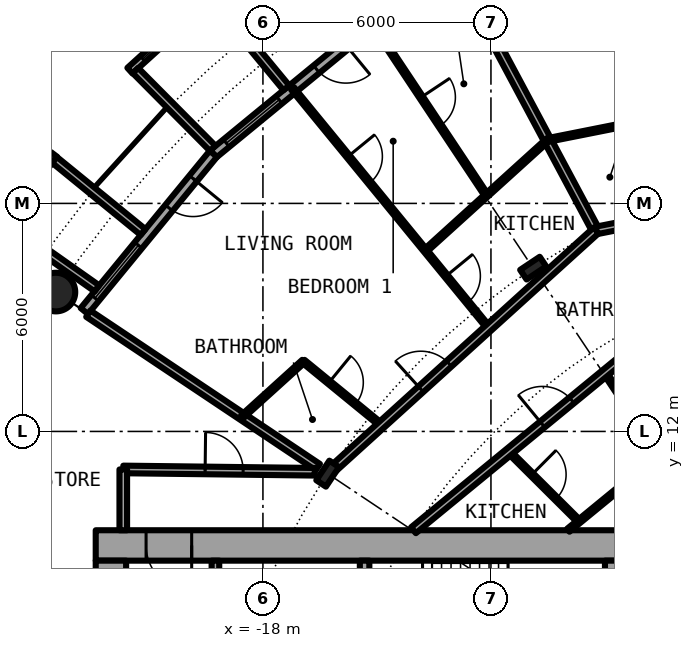
"""IFC4 building model, lengths in metres.
Left out: names, types, materials, properties, quantities, classifications, styles, units other than length and angle.
Written with IfcOpenShell. Run it as: python <this file> out.ifc"""

import sys

from ifc_helpers import new_model, si_unit, direction, frame, frame_2d, origin, origin_2d, place, context, subcontext, project, spatial, rectangle, circle, hollow_circle, i_section, extrude, element, fill, save


model = new_model("IFC4")
c1 = context("Model", 3, precision=1e-05, world=origin(), true_north=direction((0.0, 1.0)))
c2 = subcontext(c1, "Body", "Model", "MODEL_VIEW")
j1 = project(units=[si_unit("LENGTHUNIT", "METRE"), si_unit("PLANEANGLEUNIT", "RADIAN")], contexts=[c1])
p1 = place(None, origin())
s1 = spatial("IfcSite", under=j1, at=p1, CompositionType="ELEMENT")
p2 = place(p1, origin())
s2 = spatial("IfcBuilding", under=s1, at=p2, CompositionType="ELEMENT")
p3 = place(p2, frame((0.0, 0.0, 35.0)))
s3 = spatial("IfcBuildingStorey", under=s2, at=p3, CompositionType="ELEMENT", Elevation=35.0)
p4 = place(p3, frame((-23.448, 15.667, 0.0), z_axis=(0.0, 0.0, 1.0), x_axis=(1.0, 0.0, 0.0)))
e1 = element("IfcColumn", 1, at=p4, inside=s3, PredefinedType="COLUMN", context=c2, shape_type="SweptSolid", body=[
    extrude(hollow_circle(Radius=0.508, WallThickness=0.05, at=origin_2d()), origin(), (0.0, 0.0, 1.0), 3.05),
])
for number, where, z_axis, x_axis in (
    (2, (-10.889, 16.297, 0.0), (0.0, 0.0, 1.0), (-0.556, 0.831, 0.0)),
    (3, (-16.297, 10.889, 0.0), (0.0, 0.0, 1.0), (-0.831, 0.556, 0.0)),
):
    element("IfcColumn", number, at=place(p3, frame(where, z_axis=z_axis, x_axis=x_axis)), inside=s3, PredefinedType="COLUMN", context=c2, shape_type="SweptSolid", body=[
        extrude(i_section(OverallWidth=0.305, OverallDepth=0.62, WebThickness=0.021, FlangeThickness=0.04, FilletRadius=0.027, at=origin_2d()), origin(), (0.0, 0.0, 1.0), 3.05),
    ])
p5 = place(p3, frame((-15.167, 22.699, 0.0), z_axis=(0.0, 0.0, 1.0), x_axis=(-0.773019449054, -0.634382322723, 0.0)))
e4 = element("IfcWall", 4, at=p5, inside=s3, PredefinedType="SOLIDWALL", context=c2, shape_type="SweptSolid", body=[
    extrude(rectangle(XDim=5.352, YDim=0.25, at=frame_2d((2.676, 0.0))), origin(), (0.0, 0.0, 1.0), 2.7),
])
p6 = place(p5, frame((0.841, 0.0, 0.0)))
e5 = element("IfcOpeningElement", 5, at=p6, cuts=e4, PredefinedType="OPENING", context=c2, shape_type="SweptSolid", body=[
    extrude(rectangle(XDim=1.0, YDim=2.2, at=frame_2d((0.5, 1.1))), frame((0.0, 0.135, 0.0), z_axis=(0.0, -1.0, 0.0), x_axis=(1.0, 0.0, 0.0)), (0.0, 0.0, 1.0), 0.27),
])
p7 = place(p5, frame((3.111, 0.0, 0.3)))
e6 = element("IfcOpeningElement", 6, at=p7, cuts=e4, PredefinedType="OPENING", context=c2, shape_type="SweptSolid", body=[
    extrude(rectangle(XDim=1.8, YDim=2.1, at=frame_2d((0.9, 1.05))), frame((0.0, 0.135, 0.0), z_axis=(0.0, -1.0, 0.0), x_axis=(1.0, 0.0, 0.0)), (0.0, 0.0, 1.0), 0.27),
])
p8 = place(p3, frame((-19.282, 23.503, -0.03), z_axis=(0.0, 0.0, 1.0), x_axis=(-0.740998365753, -0.671506829416, 0.0)))
e7 = element("IfcWall", 7, at=p8, inside=s3, PredefinedType="SOLIDWALL", context=c2, shape_type="SweptSolid", body=[
    extrude(rectangle(XDim=2.993, YDim=0.2, at=frame_2d((1.497, 0.0))), origin(), (0.0, 0.0, 1.0), 2.73),
])
p9 = place(p8, frame((0.457, 0.0, 0.33)))
e8 = element("IfcOpeningElement", 8, at=p9, cuts=e7, PredefinedType="OPENING", context=c2, shape_type="SweptSolid", body=[
    extrude(circle(Radius=1.04, at=frame_2d((1.04, 1.04))), frame((0.0, 0.11, 0.0), z_axis=(0.0, -1.0, 0.0), x_axis=(1.0, 0.0, 0.0)), (0.0, 0.0, 1.0), 0.22),
])
p10 = place(p3, frame((-17.384, 21.041, -0.03), z_axis=(0.0, 0.0, 1.0), x_axis=(-0.63709551667, 0.770784861449, 0.0)))
e9 = element("IfcWall", 9, at=p10, inside=s3, PredefinedType="SOLIDWALL", context=c2, shape_type="SweptSolid", body=[
    extrude(rectangle(XDim=3.006, YDim=0.2, at=frame_2d((1.503, 0.0))), origin(), (0.0, 0.0, 1.0), 2.73),
])
p11 = place(p3, frame((-19.323, 19.45, -0.03), z_axis=(0.0, 0.0, 1.0), x_axis=(-0.704476739375, 0.709727076896, 0.0)))
e10 = element("IfcWall", 10, at=p11, inside=s3, PredefinedType="SOLIDWALL", context=c2, shape_type="SweptSolid", body=[
    extrude(rectangle(XDim=2.883, YDim=0.2, at=frame_2d((1.441, 0.0))), origin(), (0.0, 0.0, 1.0), 2.73),
])
p12 = place(p3, frame((-19.304, 19.304, 0.0), z_axis=(0.0, 0.0, 1.0), x_axis=(-0.634382322723, -0.773019449054, 0.0)))
e11 = element("IfcWall", 11, at=p12, inside=s3, PredefinedType="SOLIDWALL", context=c2, shape_type="SweptSolid", body=[
    extrude(rectangle(XDim=5.352, YDim=0.25, at=frame_2d((2.676, 0.0))), origin(), (0.0, 0.0, 1.0), 2.7),
])
p13 = place(p12, frame((0.841, 0.0, 0.0)))
e12 = element("IfcOpeningElement", 12, at=p13, cuts=e11, PredefinedType="OPENING", context=c2, shape_type="SweptSolid", body=[
    extrude(rectangle(XDim=1.0, YDim=2.2, at=frame_2d((0.5, 1.1))), frame((0.0, 0.135, 0.0), z_axis=(0.0, -1.0, 0.0), x_axis=(1.0, 0.0, 0.0)), (0.0, 0.0, 1.0), 0.27),
])
p14 = place(p12, frame((3.111, 0.0, 0.3)))
e13 = element("IfcOpeningElement", 13, at=p14, cuts=e11, PredefinedType="OPENING", context=c2, shape_type="SweptSolid", body=[
    extrude(rectangle(XDim=1.8, YDim=2.1, at=frame_2d((0.9, 1.05))), frame((0.0, 0.135, 0.0), z_axis=(0.0, -1.0, 0.0), x_axis=(1.0, 0.0, 0.0)), (0.0, 0.0, 1.0), 0.27),
])
p15 = place(p3, frame((-23.497, 19.289, -0.03), z_axis=(0.0, 0.0, 1.0), x_axis=(-0.60418752353, -0.796842165306, 0.0)))
e14 = element("IfcWall", 14, at=p15, inside=s3, PredefinedType="SOLIDWALL", context=c2, shape_type="SweptSolid", body=[
    extrude(rectangle(XDim=2.337, YDim=0.2, at=frame_2d((1.168, 0.0))), origin(), (0.0, 0.0, 1.0), 2.73),
])
p16 = place(p15, frame((0.128, 0.0, 0.33)))
e15 = element("IfcOpeningElement", 15, at=p16, cuts=e14, PredefinedType="OPENING", context=c2, shape_type="SweptSolid", body=[
    extrude(circle(Radius=1.04, at=frame_2d((1.04, 1.04))), frame((0.0, 0.11, 0.0), z_axis=(0.0, -1.0, 0.0), x_axis=(1.0, 0.0, 0.0)), (0.0, 0.0, 1.0), 0.22),
])
p17 = place(p3, frame((-21.155, 17.246, -0.03), z_axis=(0.0, 0.0, 1.0), x_axis=(-0.775179004516, 0.631741648902, 0.0)))
e16 = element("IfcWall", 16, at=p17, inside=s3, PredefinedType="SOLIDWALL", context=c2, shape_type="SweptSolid", body=[
    extrude(rectangle(XDim=3.006, YDim=0.2, at=frame_2d((1.503, 0.0))), origin(), (0.0, 0.0, 1.0), 2.73),
])
p18 = place(p3, frame((-22.37, 15.765, -0.03), z_axis=(0.0, 0.0, 1.0), x_axis=(-0.817256123454, 0.576274612209, 0.0)))
e17 = element("IfcWall", 17, at=p18, inside=s3, PredefinedType="SOLIDWALL", context=c2, shape_type="SweptSolid", body=[
    extrude(rectangle(XDim=2.933, YDim=0.2, at=frame_2d((1.466, 0.0))), origin(), (0.0, 0.0, 1.0), 2.73),
])
p19 = place(p3, frame((-8.2, 9.0, 0.0), z_axis=(0.0, 0.0, 1.0), x_axis=(-1.0, 0.0, 0.0)))
e18 = element("IfcWall", 18, at=p19, inside=s3, PredefinedType="SHEAR", context=c2, shape_type="SweptSolid", body=[
    extrude(rectangle(XDim=14.2, YDim=0.8, at=frame_2d((7.1, 0.0))), origin(), (0.0, 0.0, 1.0), 3.05),
])
p20 = place(p19, frame((11.675, 0.0, 0.0)))
e19 = element("IfcOpeningElement", 19, at=p20, cuts=e18, PredefinedType="OPENING", context=c2, shape_type="SweptSolid", body=[
    extrude(rectangle(XDim=1.2, YDim=2.3, at=frame_2d((0.6, 1.15))), frame((0.0, 0.41, 0.0), z_axis=(0.0, -1.0, 0.0), x_axis=(1.0, 0.0, 0.0)), (0.0, 0.0, 1.0), 0.82),
])
p21 = place(p3, frame((-22.0, -8.6, 0.0), z_axis=(0.0, 0.0, 1.0), x_axis=(0.0, 1.0, 0.0)))
e20 = element("IfcWall", 20, at=p21, inside=s3, PredefinedType="SHEAR", context=c2, shape_type="SweptSolid", body=[
    extrude(rectangle(XDim=17.2, YDim=0.8, at=frame_2d((8.6, 0.0))), origin(), (0.0, 0.0, 1.0), 3.05),
])
p22 = place(p21, frame((7.7, 0.0, 0.0)))
e21 = element("IfcOpeningElement", 21, at=p22, cuts=e20, PredefinedType="OPENING", context=c2, shape_type="SweptSolid", body=[
    extrude(rectangle(XDim=1.8, YDim=2.3, at=frame_2d((0.9, 1.15))), frame((0.0, 0.41, 0.0), z_axis=(0.0, -1.0, 0.0), x_axis=(1.0, 0.0, 0.0)), (0.0, 0.0, 1.0), 0.82),
])
p23 = place(p3, frame((-8.6, 8.6, 0.0), z_axis=(0.0, 0.0, 1.0), x_axis=(0.0, -1.0, 0.0)))
e22 = element("IfcWall", 22, at=p23, inside=s3, PredefinedType="SHEAR", context=c2, shape_type="SweptSolid", body=[
    extrude(rectangle(XDim=17.2, YDim=0.8, at=frame_2d((8.6, 0.0))), origin(), (0.0, 0.0, 1.0), 3.05),
])
p24 = place(p23, frame((7.4, 0.0, 0.1)))
e23 = element("IfcOpeningElement", 23, at=p24, cuts=e22, PredefinedType="OPENING", context=c2, shape_type="SweptSolid", body=[
    extrude(rectangle(XDim=2.4, YDim=2.2, at=frame_2d((1.2, 1.1))), frame((0.0, 0.41, 0.0), z_axis=(0.0, -1.0, 0.0), x_axis=(1.0, 0.0, 0.0)), (0.0, 0.0, 1.0), 0.82),
])
p25 = place(p3, frame((-15.325, 8.6, 0.0), z_axis=(0.0, 0.0, 1.0), x_axis=(0.0, -1.0, 0.0)))
e24 = element("IfcWall", 24, at=p25, inside=s3, PredefinedType="SHEAR", context=c2, shape_type="SweptSolid", body=[
    extrude(rectangle(XDim=3.95, YDim=0.25, at=frame_2d((1.975, 0.0))), origin(), (0.0, 0.0, 1.0), 3.05),
])
p26 = place(p25, frame((2.025, 0.0, 0.0)))
e25 = element("IfcOpeningElement", 25, at=p26, cuts=e24, PredefinedType="OPENING", context=c2, shape_type="SweptSolid", body=[
    extrude(rectangle(XDim=1.2, YDim=2.3, at=frame_2d((0.6, 1.15))), frame((0.0, 0.135, 0.0), z_axis=(0.0, -1.0, 0.0), x_axis=(1.0, 0.0, 0.0)), (0.0, 0.0, 1.0), 0.27),
])
p27 = place(p3, frame((-19.25, 8.6, 0.0), z_axis=(0.0, 0.0, 1.0), x_axis=(0.0, -1.0, 0.0)))
e26 = element("IfcWall", 26, at=p27, inside=s3, PredefinedType="SOLIDWALL", context=c2, shape_type="SweptSolid", body=[
    extrude(rectangle(XDim=7.025, YDim=0.2, at=frame_2d((3.513, 0.0))), origin(), (0.0, 0.0, 1.0), 2.7),
])
p28 = place(p27, frame((2.35, 0.0, 0.0)))
e27 = element("IfcOpeningElement", 27, at=p28, cuts=e26, PredefinedType="OPENING", context=c2, shape_type="SweptSolid", body=[
    extrude(rectangle(XDim=1.1, YDim=2.3, at=frame_2d((0.55, 1.15))), frame((0.0, 0.11, 0.0), z_axis=(0.0, -1.0, 0.0), x_axis=(1.0, 0.0, 0.0)), (0.0, 0.0, 1.0), 0.22),
])
p29 = place(p3, frame((-22.595, 15.098, 0.0), z_axis=(0.0, 0.0, 1.0), x_axis=(0.831403467378, -0.55566921314, 0.0)))
e28 = element("IfcWall", 28, at=p29, inside=s3, PredefinedType="PARTITIONING", context=c2, shape_type="SweptSolid", body=[
    extrude(rectangle(XDim=7.265, YDim=0.2, at=frame_2d((3.632, 0.0))), origin(), (0.0, 0.0, 1.0), 2.7),
])
p30 = place(p3, frame((-17.219, 21.023, 0.0), z_axis=(0.0, 0.0, 1.0), x_axis=(0.633664062855, -0.773608334654, 0.0)))
e29 = element("IfcWall", 29, at=p30, inside=s3, PredefinedType="PARTITIONING", context=c2, shape_type="SweptSolid", body=[
    extrude(rectangle(XDim=8.138, YDim=0.1, at=frame_2d((4.069, 0.0))), origin(), (0.0, 0.0, 1.0), 2.7),
])
p31 = place(p30, frame((6.377, 0.0, 0.0)))
e30 = element("IfcOpeningElement", 30, at=p31, cuts=e29, PredefinedType="OPENING", context=c2, shape_type="SweptSolid", body=[
    extrude(rectangle(XDim=0.9, YDim=2.3, at=frame_2d((0.45, 1.15))), frame((0.0, 0.06, 0.0), z_axis=(0.0, -1.0, 0.0), x_axis=(1.0, 0.0, 0.0)), (0.0, 0.0, 1.0), 0.12),
])
p32 = place(p30, frame((2.308, 0.0, 0.0)))
e31 = element("IfcOpeningElement", 31, at=p32, cuts=e29, PredefinedType="OPENING", context=c2, shape_type="SweptSolid", body=[
    extrude(rectangle(XDim=0.9, YDim=2.3, at=frame_2d((0.45, 1.15))), frame((0.0, 0.06, 0.0), z_axis=(0.0, -1.0, 0.0), x_axis=(1.0, 0.0, 0.0)), (0.0, 0.0, 1.0), 0.12),
])
p33 = place(p3, frame((-16.936, 13.845, 0.0), z_axis=(0.0, 0.0, 1.0), x_axis=(0.774162545943, -0.632986850147, 0.0)))
e32 = element("IfcWall", 32, at=p33, inside=s3, PredefinedType="PARTITIONING", context=c2, shape_type="SweptSolid", body=[
    extrude(rectangle(XDim=2.649, YDim=0.1, at=frame_2d((1.325, 0.0))), origin(), (0.0, 0.0, 1.0), 2.7),
])
p34 = place(p33, frame((0.875, 0.0, 0.0)))
e33 = element("IfcOpeningElement", 33, at=p34, cuts=e32, PredefinedType="OPENING", context=c2, shape_type="SweptSolid", body=[
    extrude(rectangle(XDim=0.9, YDim=2.3, at=frame_2d((0.45, 1.15))), frame((0.0, 0.06, 0.0), z_axis=(0.0, -1.0, 0.0), x_axis=(1.0, 0.0, 0.0)), (0.0, 0.0, 1.0), 0.12),
])
p35 = place(p3, frame((-15.054, 22.624, 0.0), z_axis=(0.0, 0.0, 1.0), x_axis=(0.553913391217, -0.832574294, 0.0)))
e34 = element("IfcWall", 34, at=p35, inside=s3, PredefinedType="PARTITIONING", context=c2, shape_type="SweptSolid", body=[
    extrude(rectangle(XDim=5.301, YDim=0.1, at=frame_2d((2.65, 0.0))), origin(), (0.0, 0.0, 1.0), 2.7),
])
p36 = place(p35, frame((2.2, 0.0, 0.0)))
e35 = element("IfcOpeningElement", 35, at=p36, cuts=e34, PredefinedType="OPENING", context=c2, shape_type="SweptSolid", body=[
    extrude(rectangle(XDim=0.9, YDim=2.3, at=frame_2d((0.45, 1.15))), frame((0.0, 0.06, 0.0), z_axis=(0.0, -1.0, 0.0), x_axis=(1.0, 0.0, 0.0)), (0.0, 0.0, 1.0), 0.12),
])
p37 = place(p3, frame((-12.81, 23.966, 0.0), z_axis=(0.0, 0.0, 1.0), x_axis=(0.471439510802, -0.881898399848, 0.0)))
e36 = element("IfcWall", 36, at=p37, inside=s3, PredefinedType="PARTITIONING", context=c2, shape_type="SweptSolid", body=[
    extrude(rectangle(XDim=7.575, YDim=0.2, at=frame_2d((3.787, 0.0))), origin(), (0.0, 0.0, 1.0), 2.7),
])
p38 = place(p3, frame((-11.524, 11.464, 0.0), z_axis=(0.0, 0.0, 1.0), x_axis=(0.708796844581, -0.705412668665, 0.0)))
e37 = element("IfcWall", 37, at=p38, inside=s3, PredefinedType="PARTITIONING", context=c2, shape_type="SweptSolid", body=[
    extrude(rectangle(XDim=2.597, YDim=0.1, at=frame_2d((1.299, 0.0))), origin(), (0.0, 0.0, 1.0), 2.7),
])
p39 = place(p38, frame((0.849, 0.0, 0.0)))
e38 = element("IfcOpeningElement", 38, at=p39, cuts=e37, PredefinedType="OPENING", context=c2, shape_type="SweptSolid", body=[
    extrude(rectangle(XDim=0.9, YDim=2.3, at=frame_2d((0.45, 1.15))), frame((0.0, 0.06, 0.0), z_axis=(0.0, -1.0, 0.0), x_axis=(1.0, 0.0, 0.0)), (0.0, 0.0, 1.0), 0.12),
])
p40 = place(p3, frame((-8.996, 13.539, 0.0), z_axis=(0.0, 0.0, 1.0), x_axis=(0.553615197403, -0.83277260594, 0.0)))
e39 = element("IfcWall", 39, at=p40, inside=s3, PredefinedType="PARTITIONING", context=c2, shape_type="SweptSolid", body=[
    extrude(rectangle(XDim=2.597, YDim=0.1, at=frame_2d((1.299, 0.0))), origin(), (0.0, 0.0, 1.0), 2.7),
])
p41 = place(p3, frame((-21.675, 11.0, 0.0), z_axis=(0.0, 0.0, 1.0), x_axis=(0.999926652916, -0.012111514691, 0.0)))
e40 = element("IfcWall", 40, at=p41, inside=s3, PredefinedType="PARTITIONING", context=c2, shape_type="SweptSolid", body=[
    extrude(rectangle(XDim=5.04, YDim=0.2, at=frame_2d((2.52, 0.0))), origin(), (0.0, 0.0, 1.0), 2.7),
])
p42 = place(p41, frame((2.154, 0.0, 0.0)))
e41 = element("IfcOpeningElement", 41, at=p42, cuts=e40, PredefinedType="OPENING", context=c2, shape_type="SweptSolid", body=[
    extrude(rectangle(XDim=1.0, YDim=2.3, at=frame_2d((0.5, 1.15))), frame((0.0, 0.11, 0.0), z_axis=(0.0, -1.0, 0.0), x_axis=(1.0, 0.0, 0.0)), (0.0, 0.0, 1.0), 0.22),
])
p43 = place(p3, frame((-9.965, 9.4, 0.0), z_axis=(0.0, 0.0, 1.0), x_axis=(0.773141825369, 0.634233173104, 0.0)))
e42 = element("IfcWall", 42, at=p43, inside=s3, PredefinedType="PARTITIONING", context=c2, shape_type="SweptSolid", body=[
    extrude(rectangle(XDim=1.749, YDim=0.1, at=frame_2d((0.875, 0.0))), origin(), (0.0, 0.0, 1.0), 2.7),
])
p44 = place(p3, frame((-14.039, 9.4, 0.0), z_axis=(0.0, 0.0, 1.0), x_axis=(0.77298340166, 0.634426245326, 0.0)))
e43 = element("IfcWall", 43, at=p44, inside=s3, PredefinedType="PARTITIONING", context=c2, shape_type="SweptSolid", body=[
    extrude(rectangle(XDim=9.793, YDim=0.2, at=frame_2d((4.896, 0.0))), origin(), (0.0, 0.0, 1.0), 2.7),
])
p45 = place(p44, frame((4.389, 0.0, 0.0)))
e44 = element("IfcOpeningElement", 44, at=p45, cuts=e43, PredefinedType="OPENING", context=c2, shape_type="SweptSolid", body=[
    extrude(rectangle(XDim=1.0, YDim=2.3, at=frame_2d((0.5, 1.15))), frame((0.0, 0.11, 0.0), z_axis=(0.0, -1.0, 0.0), x_axis=(1.0, 0.0, 0.0)), (0.0, 0.0, 1.0), 0.22),
])
p46 = place(p3, frame((-9.239, 17.286, 0.0), z_axis=(0.0, 0.0, 1.0), x_axis=(0.98077905287, 0.195121627328, 0.0)))
e45 = element("IfcWall", 45, at=p46, inside=s3, PredefinedType="PARTITIONING", context=c2, shape_type="SweptSolid", body=[
    extrude(rectangle(XDim=11.379, YDim=0.2, at=frame_2d((5.689, 0.0))), origin(), (0.0, 0.0, 1.0), 2.38),
])
p47 = place(p46, frame((3.293, 0.0, 0.0)))
e46 = element("IfcOpeningElement", 46, at=p47, cuts=e45, PredefinedType="OPENING", context=c2, shape_type="SweptSolid", body=[
    extrude(rectangle(XDim=1.0, YDim=2.3, at=frame_2d((0.5, 1.15))), frame((0.0, 0.11, 0.0), z_axis=(0.0, -1.0, 0.0), x_axis=(1.0, 0.0, 0.0)), (0.0, 0.0, 1.0), 0.22),
])
p48 = place(p3, frame((-16.18, 10.995, 0.0), z_axis=(0.0, 0.0, 1.0), x_axis=(0.74112906966, 0.671362571272, 0.0)))
e47 = element("IfcWall", 47, at=p48, inside=s3, PredefinedType="PARTITIONING", context=c2, shape_type="SweptSolid", body=[
    extrude(rectangle(XDim=9.375, YDim=0.2, at=frame_2d((4.688, 0.0))), origin(), (0.0, 0.0, 1.0), 2.38),
])
p49 = place(p48, frame((3.152, 0.0, 0.0)))
e48 = element("IfcOpeningElement", 48, at=p49, cuts=e47, PredefinedType="OPENING", context=c2, shape_type="SweptSolid", body=[
    extrude(rectangle(XDim=1.0, YDim=2.3, at=frame_2d((0.5, 1.15))), frame((0.0, 0.11, 0.0), z_axis=(0.0, -1.0, 0.0), x_axis=(1.0, 0.0, 0.0)), (0.0, 0.0, 1.0), 0.22),
])
p50 = place(p3, frame((-10.511, 19.667, 0.0), z_axis=(0.0, 0.0, 1.0), x_axis=(0.980784706341, 0.195093208, 0.0)))
e49 = element("IfcWall", 49, at=p50, inside=s3, PredefinedType="PARTITIONING", context=c2, shape_type="SweptSolid", body=[
    extrude(rectangle(XDim=2.157, YDim=0.1, at=frame_2d((1.079, 0.0))), origin(), (0.0, 0.0, 1.0), 2.7),
])
p51 = place(p3, frame((-18.54, 12.392, 0.0), z_axis=(0.0, 0.0, 1.0), x_axis=(0.741319612235, 0.671152167929, 0.0)))
e50 = element("IfcWall", 50, at=p51, inside=s3, PredefinedType="PARTITIONING", context=c2, shape_type="SweptSolid", body=[
    extrude(rectangle(XDim=2.168, YDim=0.1, at=frame_2d((1.084, 0.0))), origin(), (0.0, 0.0, 1.0), 2.7),
])
p52 = place(p3, frame((-13.727, 16.754, 0.0), z_axis=(0.0, 0.0, 1.0), x_axis=(0.741134692738, 0.671356363804, 0.0)))
e51 = element("IfcWall", 51, at=p52, inside=s3, PredefinedType="PARTITIONING", context=c2, shape_type="SweptSolid", body=[
    extrude(rectangle(XDim=4.342, YDim=0.1, at=frame_2d((2.171, 0.0))), origin(), (0.0, 0.0, 1.0), 2.7),
])
p53 = place(p3, frame((-21.675, 9.4, 0.0), z_axis=(0.0, 0.0, 1.0), x_axis=(0.0, 1.0, 0.0)))
e52 = element("IfcWall", 52, at=p53, inside=s3, PredefinedType="PARTITIONING", context=c2, shape_type="SweptSolid", body=[
    extrude(rectangle(XDim=1.6, YDim=0.2, at=frame_2d((0.8, 0.0))), origin(), (0.0, 0.0, 1.0), 2.7),
])
p54 = place(p6, origin())
e53 = element("IfcDoor", 53, at=p54, inside=s3, OperationType="SINGLE_SWING_LEFT", PredefinedType="DOOR", context=c2, shape_type="SweptSolid", body=[
    extrude(rectangle(XDim=1.0, YDim=2.2, at=frame_2d((0.5, 1.1))), frame((0.0, 0.025, 0.0), z_axis=(0.0, -1.0, 0.0), x_axis=(1.0, 0.0, 0.0)), (0.0, 0.0, 1.0), 0.05),
])
fill(e5, e53)
p55 = place(p7, origin())
e54 = element("IfcWindow", 54, at=p55, inside=s3, PartitioningType="SINGLE_PANEL", PredefinedType="WINDOW", context=c2, shape_type="SweptSolid", body=[
    extrude(rectangle(XDim=1.8, YDim=2.1, at=frame_2d((0.9, 1.05))), frame((0.0, 0.03, 0.0), z_axis=(0.0, -1.0, 0.0), x_axis=(1.0, 0.0, 0.0)), (0.0, 0.0, 1.0), 0.06),
])
fill(e6, e54)
p56 = place(p9, origin())
e55 = element("IfcWindow", 55, at=p56, inside=s3, PartitioningType="SINGLE_PANEL", PredefinedType="WINDOW", context=c2, shape_type="SweptSolid", body=[
    extrude(circle(Radius=1.04, at=frame_2d((1.04, 1.04))), frame((0.0, 0.03, 0.0), z_axis=(0.0, -1.0, 0.0), x_axis=(1.0, 0.0, 0.0)), (0.0, 0.0, 1.0), 0.06),
])
fill(e8, e55)
p57 = place(p13, origin())
e56 = element("IfcDoor", 56, at=p57, inside=s3, OperationType="SINGLE_SWING_LEFT", PredefinedType="DOOR", context=c2, shape_type="SweptSolid", body=[
    extrude(rectangle(XDim=1.0, YDim=2.2, at=frame_2d((0.5, 1.1))), frame((0.0, 0.025, 0.0), z_axis=(0.0, -1.0, 0.0), x_axis=(1.0, 0.0, 0.0)), (0.0, 0.0, 1.0), 0.05),
])
fill(e12, e56)
p58 = place(p14, origin())
e57 = element("IfcWindow", 57, at=p58, inside=s3, PartitioningType="SINGLE_PANEL", PredefinedType="WINDOW", context=c2, shape_type="SweptSolid", body=[
    extrude(rectangle(XDim=1.8, YDim=2.1, at=frame_2d((0.9, 1.05))), frame((0.0, 0.03, 0.0), z_axis=(0.0, -1.0, 0.0), x_axis=(1.0, 0.0, 0.0)), (0.0, 0.0, 1.0), 0.06),
])
fill(e13, e57)
p59 = place(p20, origin())
e58 = element("IfcDoor", 58, at=p59, inside=s3, OperationType="SINGLE_SWING_LEFT", PredefinedType="DOOR", context=c2, shape_type="SweptSolid", body=[
    extrude(rectangle(XDim=1.2, YDim=2.3, at=frame_2d((0.6, 1.15))), frame((0.0, 0.025, 0.0), z_axis=(0.0, -1.0, 0.0), x_axis=(1.0, 0.0, 0.0)), (0.0, 0.0, 1.0), 0.05),
])
fill(e19, e58)
p60 = place(p49, origin())
e59 = element("IfcDoor", 59, at=p60, inside=s3, OperationType="SINGLE_SWING_LEFT", PredefinedType="DOOR", context=c2, shape_type="SweptSolid", body=[
    extrude(rectangle(XDim=1.0, YDim=2.3, at=frame_2d((0.5, 1.15))), frame((0.0, 0.025, 0.0), z_axis=(0.0, -1.0, 0.0), x_axis=(1.0, 0.0, 0.0)), (0.0, 0.0, 1.0), 0.05),
])
fill(e48, e59)
p61 = place(p34, origin())
e60 = element("IfcDoor", 60, at=p61, inside=s3, OperationType="SINGLE_SWING_LEFT", PredefinedType="DOOR", context=c2, shape_type="SweptSolid", body=[
    extrude(rectangle(XDim=0.9, YDim=2.3, at=frame_2d((0.45, 1.15))), frame((0.0, 0.025, 0.0), z_axis=(0.0, -1.0, 0.0), x_axis=(1.0, 0.0, 0.0)), (0.0, 0.0, 1.0), 0.05),
])
fill(e33, e60)
p62 = place(p31, origin())
e61 = element("IfcDoor", 61, at=p62, inside=s3, OperationType="SINGLE_SWING_RIGHT", PredefinedType="DOOR", context=c2, shape_type="SweptSolid", body=[
    extrude(rectangle(XDim=0.9, YDim=2.3, at=frame_2d((0.45, 1.15))), frame((0.0, 0.025, 0.0), z_axis=(0.0, -1.0, 0.0), x_axis=(1.0, 0.0, 0.0)), (0.0, 0.0, 1.0), 0.05),
])
fill(e30, e61)
p63 = place(p32, origin())
e62 = element("IfcDoor", 62, at=p63, inside=s3, OperationType="SINGLE_SWING_LEFT", PredefinedType="DOOR", context=c2, shape_type="SweptSolid", body=[
    extrude(rectangle(XDim=0.9, YDim=2.3, at=frame_2d((0.45, 1.15))), frame((0.0, 0.025, 0.0), z_axis=(0.0, -1.0, 0.0), x_axis=(1.0, 0.0, 0.0)), (0.0, 0.0, 1.0), 0.05),
])
fill(e31, e62)
p64 = place(p36, origin())
e63 = element("IfcDoor", 63, at=p64, inside=s3, OperationType="SINGLE_SWING_LEFT", PredefinedType="DOOR", context=c2, shape_type="SweptSolid", body=[
    extrude(rectangle(XDim=0.9, YDim=2.3, at=frame_2d((0.45, 1.15))), frame((0.0, 0.025, 0.0), z_axis=(0.0, -1.0, 0.0), x_axis=(1.0, 0.0, 0.0)), (0.0, 0.0, 1.0), 0.05),
])
fill(e35, e63)
p65 = place(p45, origin())
e64 = element("IfcDoor", 64, at=p65, inside=s3, OperationType="SINGLE_SWING_LEFT", PredefinedType="DOOR", context=c2, shape_type="SweptSolid", body=[
    extrude(rectangle(XDim=1.0, YDim=2.3, at=frame_2d((0.5, 1.15))), frame((0.0, 0.025, 0.0), z_axis=(0.0, -1.0, 0.0), x_axis=(1.0, 0.0, 0.0)), (0.0, 0.0, 1.0), 0.05),
])
fill(e44, e64)
p66 = place(p39, origin())
e65 = element("IfcDoor", 65, at=p66, inside=s3, OperationType="SINGLE_SWING_RIGHT", PredefinedType="DOOR", context=c2, shape_type="SweptSolid", body=[
    extrude(rectangle(XDim=0.9, YDim=2.3, at=frame_2d((0.45, 1.15))), frame((0.0, 0.025, 0.0), z_axis=(0.0, -1.0, 0.0), x_axis=(1.0, 0.0, 0.0)), (0.0, 0.0, 1.0), 0.05),
])
fill(e38, e65)
p67 = place(p42, origin())
e66 = element("IfcDoor", 66, at=p67, inside=s3, OperationType="SINGLE_SWING_RIGHT", PredefinedType="DOOR", context=c2, shape_type="SweptSolid", body=[
    extrude(rectangle(XDim=1.0, YDim=2.3, at=frame_2d((0.5, 1.15))), frame((0.0, 0.025, 0.0), z_axis=(0.0, -1.0, 0.0), x_axis=(1.0, 0.0, 0.0)), (0.0, 0.0, 1.0), 0.05),
])
fill(e41, e66)
save(model, sys.argv[1])
